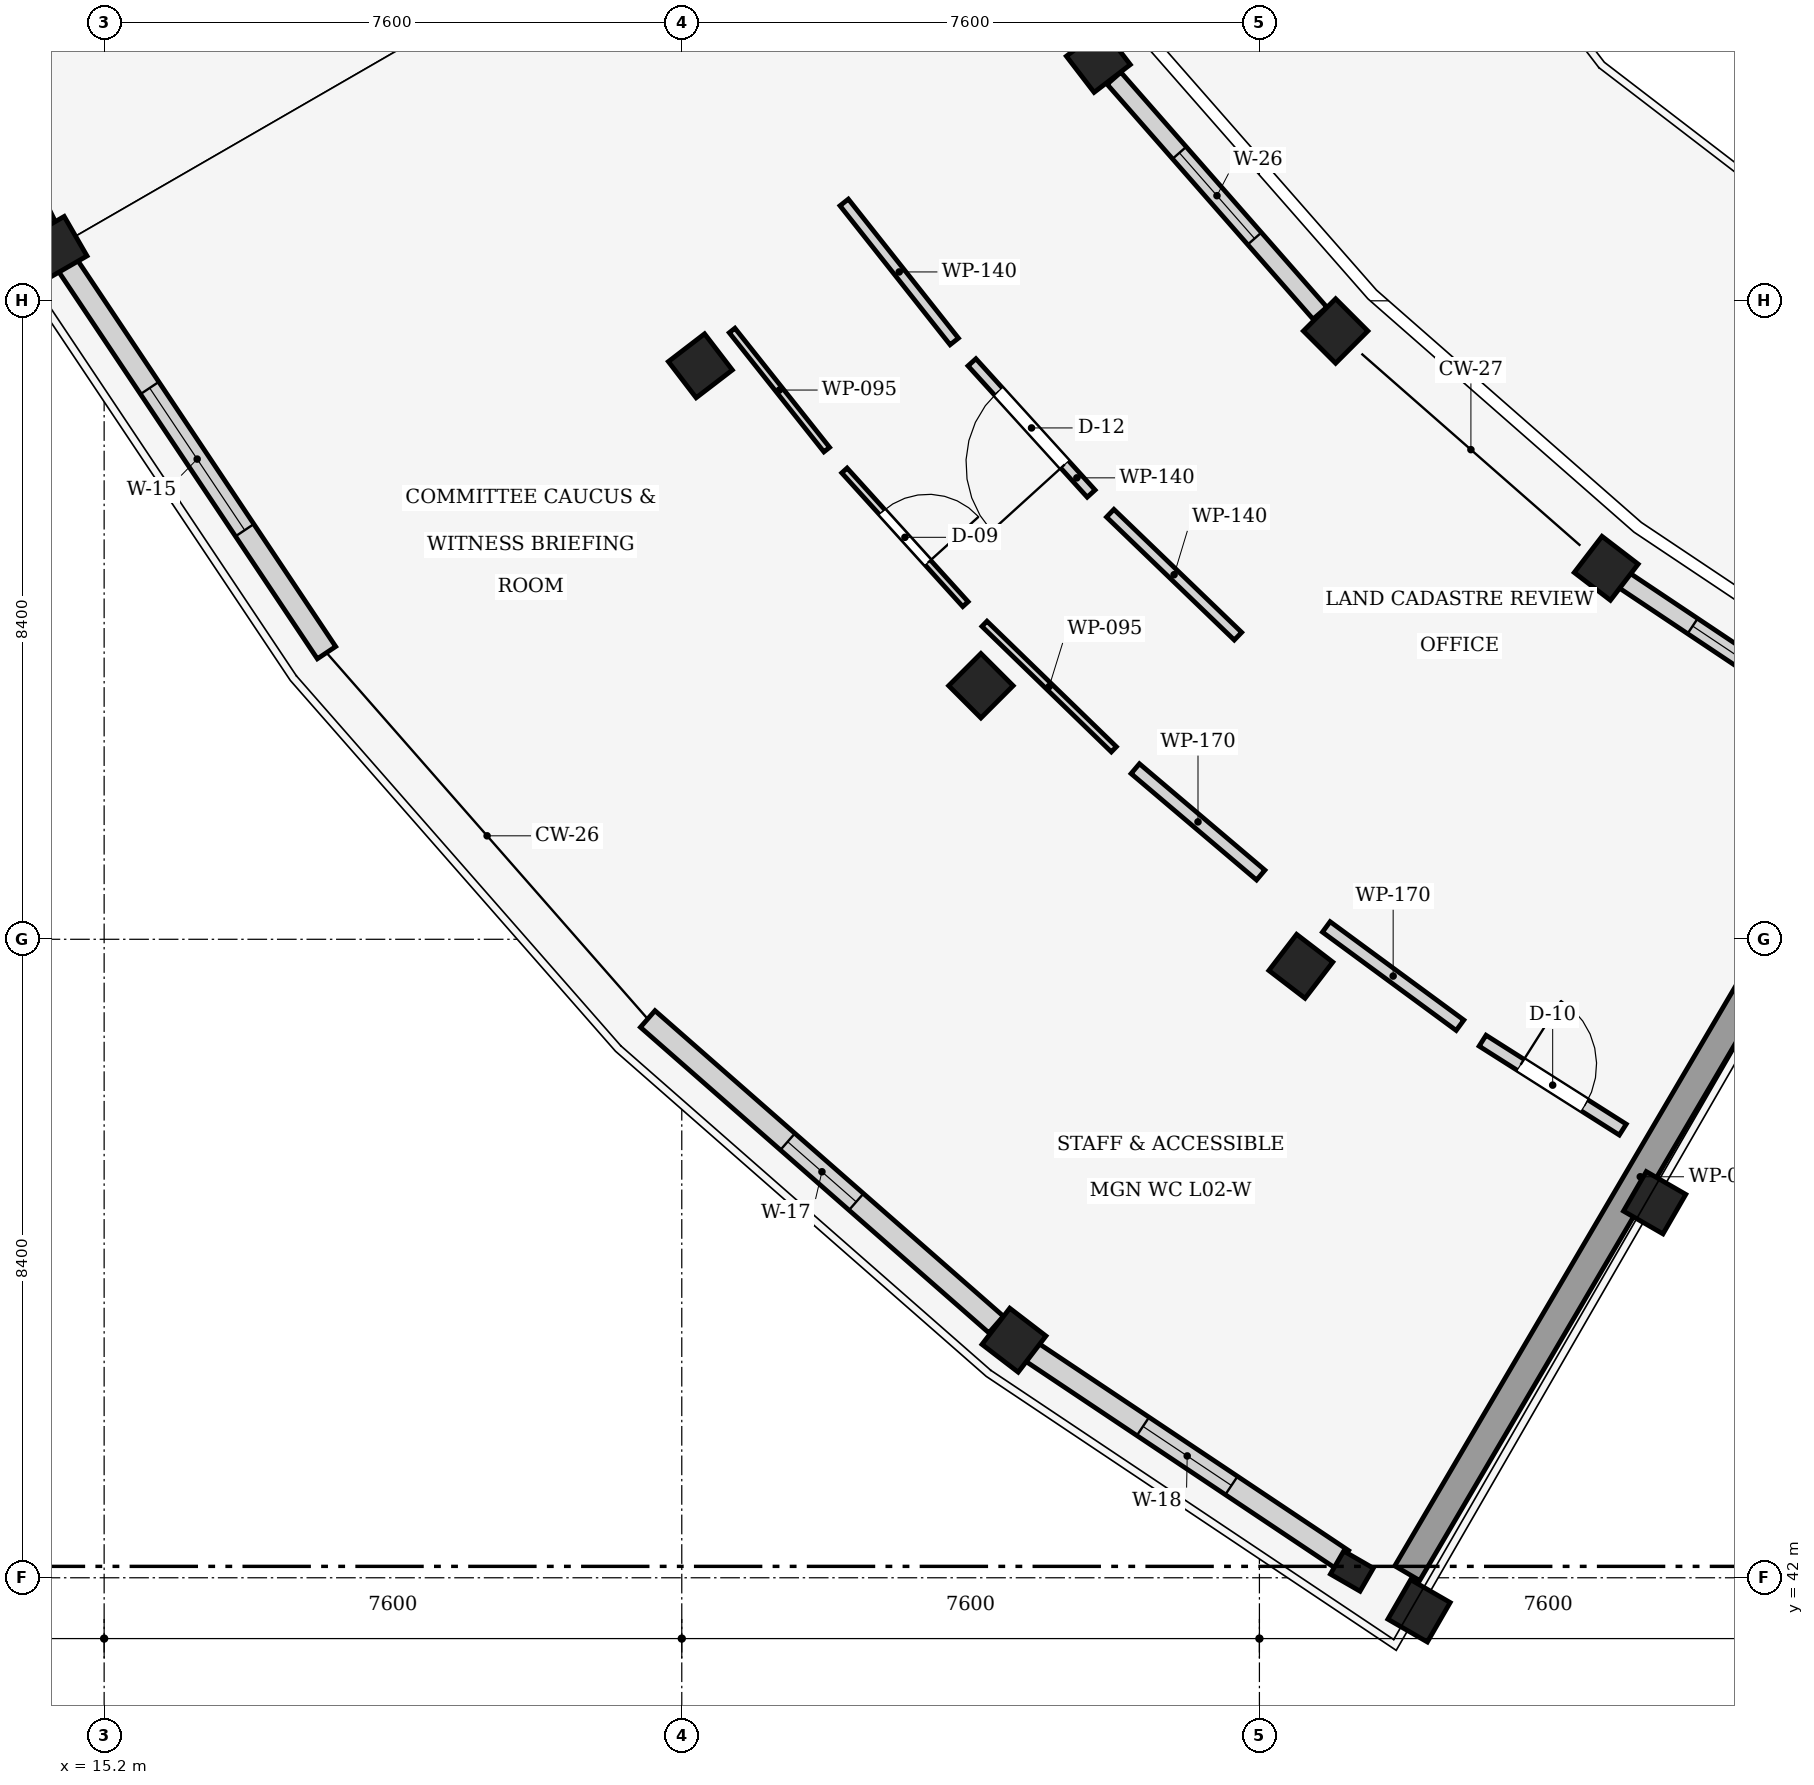
"""IFC4 building model, lengths in metres.
Left out: names, types, materials, properties, quantities, classifications, styles, units other than length and angle.
Written with IfcOpenShell. Run it as: python <this file> out.ifc"""

import sys

from ifc_helpers import new_model, si_unit, direction, frame, frame_2d, origin, origin_2d, place, context, subcontext, project, spatial, rectangle, extrude, element, fill, save


model = new_model("IFC4")
c1 = context("Model", 3, precision=1e-05, world=origin(), true_north=direction((0.0, 1.0)))
c2 = subcontext(c1, "Body", "Model", "MODEL_VIEW")
j1 = project(units=[si_unit("LENGTHUNIT", "METRE"), si_unit("PLANEANGLEUNIT", "RADIAN")], contexts=[c1])
p1 = place(None, origin())
s1 = spatial("IfcSite", under=j1, at=p1, CompositionType="ELEMENT")
p2 = place(p1, origin())
s2 = spatial("IfcBuilding", under=s1, at=p2, CompositionType="ELEMENT")
p3 = place(p2, frame((0.0, 0.0, 9.15)))
s3 = spatial("IfcBuildingStorey", under=s2, at=p3, CompositionType="ELEMENT", Elevation=9.15)
for number, where, z_axis, x_axis in (
    (1, (14.565, 59.5, 0.0), (0.0, 0.0, 1.0), (-0.866, -0.5, 0.0)),
    (2, (28.281, 61.963, 0.0), (0.0, 0.0, 1.0), (-0.793, -0.609, 0.0)),
    (3, (23.044, 57.945, 0.0), (0.0, 0.0, 1.0), (-0.793, -0.609, 0.0)),
    (4, (31.403, 58.403, 0.0), (0.0, 0.0, 1.0), (-0.707, -0.707, 0.0)),
    (5, (26.736, 53.736, 0.0), (0.0, 0.0, 1.0), (-0.707, -0.707, 0.0)),
    (6, (34.963, 55.281, 0.0), (0.0, 0.0, 1.0), (-0.609, -0.793, 0.0)),
    (7, (30.945, 50.044, 0.0), (0.0, 0.0, 1.0), (-0.609, -0.793, 0.0)),
    (8, (27.171, 45.126, 0.0), (0.0, 0.0, 1.0), (-0.609, -0.793, 0.0)),
    (9, (35.6, 46.934, 0.0), (0.0, 0.0, 1.0), (-0.5, -0.866, 0.0)),
    (10, (32.5, 41.565, 0.0), (0.0, 0.0, 1.0), (-0.5, -0.866, 0.0)),
):
    element("IfcColumn", number, at=place(p3, frame(where, z_axis=z_axis, x_axis=x_axis)), inside=s3, PredefinedType="COLUMN", context=c2, shape_type="SweptSolid", body=[
        extrude(rectangle(XDim=0.6, YDim=0.6, at=origin_2d()), origin(), (0.0, 0.0, 1.0), 4.05),
    ])
p4 = place(p3, frame((31.617, 42.087, 0.0), z_axis=(0.0, 0.0, 1.0), x_axis=(-0.5, -0.866025403784, 0.0)))
e11 = element("IfcColumn", 11, at=p4, inside=s3, PredefinedType="PILASTER", context=c2, shape_type="SweptSolid", body=[
    extrude(rectangle(XDim=0.35, YDim=0.45, at=origin_2d()), origin(), (0.0, 0.0, 1.0), 4.05),
])
p5 = place(p3, frame((14.449, 59.735, 0.0), z_axis=(0.0, 0.0, 1.0), x_axis=(-0.442328593944, 0.89685306209, 0.0)))
e12 = element("IfcWall", 12, at=p5, inside=s3, PredefinedType="STANDARD", context=c2, shape_type="SweptSolid", body=[
    extrude(rectangle(XDim=5.885, YDim=0.29, at=frame_2d((2.943, 0.0))), origin(), (0.0, 0.0, 1.0), 3.165),
])
p6 = place(p5, frame((1.943, 0.0, 0.85)))
e13 = element("IfcOpeningElement", 13, at=p6, cuts=e12, PredefinedType="OPENING", context=c2, shape_type="SweptSolid", body=[
    extrude(rectangle(XDim=2.0, YDim=1.5, at=frame_2d((1.0, 0.75))), frame((0.0, 0.155, 0.0), z_axis=(0.0, -1.0, 0.0), x_axis=(1.0, 0.0, 0.0)), (0.0, 0.0, 1.0), 0.31),
])
p7 = place(p3, frame((18.126, 54.171, 0.0), z_axis=(0.0, 0.0, 1.0), x_axis=(-0.555591845488, 0.831455170907, 0.0)))
e14 = element("IfcWall", 14, at=p7, inside=s3, PredefinedType="STANDARD", context=c2, shape_type="SweptSolid", body=[
    extrude(rectangle(XDim=6.127, YDim=0.29, at=frame_2d((3.063, 0.0))), origin(), (0.0, 0.0, 1.0), 3.7),
])
p8 = place(p7, frame((1.938, 0.0, 0.85)))
e15 = element("IfcOpeningElement", 15, at=p8, cuts=e14, PredefinedType="OPENING", context=c2, shape_type="SweptSolid", body=[
    extrude(rectangle(XDim=2.25, YDim=1.5, at=frame_2d((1.125, 0.75))), frame((0.0, 0.155, 0.0), z_axis=(0.0, -1.0, 0.0), x_axis=(1.0, 0.0, 0.0)), (0.0, 0.0, 1.0), 0.31),
])
p9 = place(p3, frame((28.487, 61.728, 0.0), z_axis=(0.0, 0.0, 1.0), x_axis=(0.659315893108, -0.751866047308, 0.0)))
e16 = element("IfcWall", 16, at=p9, inside=s3, PredefinedType="STANDARD", context=c2, shape_type="SweptSolid", body=[
    extrude(rectangle(XDim=4.11, YDim=0.24, at=frame_2d((2.055, 0.0))), origin(), (0.0, 0.0, 1.0), 3.165),
])
p10 = place(p9, frame((1.305, 0.0, 0.85)))
e17 = element("IfcOpeningElement", 17, at=p10, cuts=e16, PredefinedType="OPENING", context=c2, shape_type="SweptSolid", body=[
    extrude(rectangle(XDim=1.5, YDim=1.85, at=frame_2d((0.75, 0.925))), frame((0.0, 0.13, 0.0), z_axis=(0.0, -1.0, 0.0), x_axis=(1.0, 0.0, 0.0)), (0.0, 0.0, 1.0), 0.26),
])
p11 = place(p3, frame((26.936, 45.332, 0.0), z_axis=(0.0, 0.0, 1.0), x_axis=(-0.751841992355, 0.659343323718, 0.0)))
e18 = element("IfcWall", 18, at=p11, inside=s3, PredefinedType="STANDARD", context=c2, shape_type="SweptSolid", body=[
    extrude(rectangle(XDim=6.097, YDim=0.29, at=frame_2d((3.048, 0.0))), origin(), (0.0, 0.0, 1.0), 3.015),
])
p12 = place(p11, frame((2.448, 0.0, 0.85)))
e19 = element("IfcOpeningElement", 19, at=p12, cuts=e18, PredefinedType="OPENING", context=c2, shape_type="SweptSolid", body=[
    extrude(rectangle(XDim=1.2, YDim=1.65, at=frame_2d((0.6, 0.825))), frame((0.0, 0.155, 0.0), z_axis=(0.0, -1.0, 0.0), x_axis=(1.0, 0.0, 0.0)), (0.0, 0.0, 1.0), 0.31),
])
p13 = place(p3, frame((31.494, 42.237, 0.0), z_axis=(0.0, 0.0, 1.0), x_axis=(-0.831469224941, 0.555570812747, 0.0)))
e20 = element("IfcWall", 20, at=p13, inside=s3, PredefinedType="STANDARD", context=c2, shape_type="SweptSolid", body=[
    extrude(rectangle(XDim=4.917, YDim=0.29, at=frame_2d((2.458, 0.0))), origin(), (0.0, 0.0, 1.0), 3.015),
])
p14 = place(p13, frame((1.758, 0.0, 0.85)))
e21 = element("IfcOpeningElement", 21, at=p14, cuts=e20, PredefinedType="OPENING", context=c2, shape_type="SweptSolid", body=[
    extrude(rectangle(XDim=1.4, YDim=1.65, at=frame_2d((0.7, 0.825))), frame((0.0, 0.155, 0.0), z_axis=(0.0, -1.0, 0.0), x_axis=(1.0, 0.0, 0.0)), (0.0, 0.0, 1.0), 0.31),
])
p15 = place(p3, frame((35.198, 55.124, 0.0), z_axis=(0.0, 0.0, 1.0), x_axis=(0.831482404849, -0.555551087144, 0.0)))
e22 = element("IfcWall", 22, at=p15, inside=s3, PredefinedType="STANDARD", context=c2, shape_type="SweptSolid", body=[
    extrude(rectangle(XDim=4.17, YDim=0.24, at=frame_2d((2.085, 0.0))), origin(), (0.0, 0.0, 1.0), 3.015),
])
p16 = place(p15, frame((1.085, 0.0, 0.85)))
e23 = element("IfcOpeningElement", 23, at=p16, cuts=e22, PredefinedType="OPENING", context=c2, shape_type="SweptSolid", body=[
    extrude(rectangle(XDim=2.0, YDim=1.85, at=frame_2d((1.0, 0.925))), frame((0.0, 0.13, 0.0), z_axis=(0.0, -1.0, 0.0), x_axis=(1.0, 0.0, 0.0)), (0.0, 0.0, 1.0), 0.26),
])
p17 = place(p3, frame((38.477, 52.491, 0.0), z_axis=(0.0, 0.0, 1.0), x_axis=(-0.506804958987, -0.862060748177, 0.0)))
e24 = element("IfcWall", 24, at=p17, inside=s3, PredefinedType="SHEAR", context=c2, shape_type="SweptSolid", body=[
    extrude(rectangle(XDim=12.1, YDim=0.38, at=frame_2d((6.05, 0.0))), origin(), (0.0, 0.0, 1.0), 3.75),
])
p18 = place(p3, frame((23.462, 58.41, 0.0), z_axis=(0.0, 0.0, 1.0), x_axis=(0.621895340231, -0.78310036764, 0.0)))
e25 = element("IfcWall", 25, at=p18, inside=s3, PredefinedType="PARTITIONING", context=c2, shape_type="SweptSolid", body=[
    extrude(rectangle(XDim=2.002, YDim=0.095, at=frame_2d((1.001, 0.0))), origin(), (0.0, 0.0, 1.0), 3.015),
])
p19 = place(p3, frame((24.94, 56.568, 0.0), z_axis=(0.0, 0.0, 1.0), x_axis=(0.671247426607, -0.741233358851, 0.0)))
e26 = element("IfcWall", 26, at=p19, inside=s3, PredefinedType="PARTITIONING", context=c2, shape_type="SweptSolid", body=[
    extrude(rectangle(XDim=2.372, YDim=0.095, at=frame_2d((1.186, 0.0))), origin(), (0.0, 0.0, 1.0), 3.7),
])
p20 = place(p19, frame((0.736, 0.0, 0.0)))
e27 = element("IfcOpeningElement", 27, at=p20, cuts=e26, PredefinedType="OPENING", context=c2, shape_type="SweptSolid", body=[
    extrude(rectangle(XDim=0.9, YDim=2.22, at=frame_2d((0.45, 1.11))), frame((0.0, 0.057, 0.0), z_axis=(0.0, -1.0, 0.0), x_axis=(1.0, 0.0, 0.0)), (0.0, 0.0, 1.0), 0.115),
])
p21 = place(p3, frame((26.782, 54.551, 0.0), z_axis=(0.0, 0.0, 1.0), x_axis=(0.717780363552, -0.696269595559, 0.0)))
e28 = element("IfcWall", 28, at=p21, inside=s3, PredefinedType="PARTITIONING", context=c2, shape_type="SweptSolid", body=[
    extrude(rectangle(XDim=2.372, YDim=0.095, at=frame_2d((1.186, 0.0))), origin(), (0.0, 0.0, 1.0), 3.015),
])
p22 = place(p3, frame((31.28, 50.563, 0.0), z_axis=(0.0, 0.0, 1.0), x_axis=(0.805611783676, -0.59244379818, 0.0)))
e29 = element("IfcWall", 29, at=p22, inside=s3, PredefinedType="PARTITIONING", context=c2, shape_type="SweptSolid", body=[
    extrude(rectangle(XDim=2.184, YDim=0.17, at=frame_2d((1.092, 0.0))), origin(), (0.0, 0.0, 1.0), 3.015),
])
p23 = place(p3, frame((33.336, 49.066, 0.0), z_axis=(0.0, 0.0, 1.0), x_axis=(0.844539400536, -0.535493418206, 0.0)))
e30 = element("IfcWall", 30, at=p23, inside=s3, PredefinedType="PARTITIONING", context=c2, shape_type="SweptSolid", body=[
    extrude(rectangle(XDim=2.184, YDim=0.17, at=frame_2d((1.092, 0.0))), origin(), (0.0, 0.0, 1.0), 3.7),
])
p24 = place(p23, frame((0.592, 0.0, 0.0)))
e31 = element("IfcOpeningElement", 31, at=p24, cuts=e30, PredefinedType="OPENING", context=c2, shape_type="SweptSolid", body=[
    extrude(rectangle(XDim=1.0, YDim=2.22, at=frame_2d((0.5, 1.11))), frame((0.0, 0.095, 0.0), z_axis=(0.0, -1.0, 0.0), x_axis=(1.0, 0.0, 0.0)), (0.0, 0.0, 1.0), 0.19),
])
p25 = place(p3, frame((28.767, 52.644, 0.0), z_axis=(0.0, 0.0, 1.0), x_axis=(0.762765431764, -0.646675263255, 0.0)))
e32 = element("IfcWall", 32, at=p25, inside=s3, PredefinedType="PARTITIONING", context=c2, shape_type="SweptSolid", body=[
    extrude(rectangle(XDim=2.164, YDim=0.17, at=frame_2d((1.082, 0.0))), origin(), (0.0, 0.0, 1.0), 3.7),
])
p26 = place(p3, frame((28.186, 56.263, 0.0), z_axis=(0.0, 0.0, 1.0), x_axis=(-0.672224743142, 0.740347144728, 0.0)))
e33 = element("IfcWall", 33, at=p26, inside=s3, PredefinedType="PARTITIONING", context=c2, shape_type="SweptSolid", body=[
    extrude(rectangle(XDim=2.333, YDim=0.14, at=frame_2d((1.167, 0.0))), origin(), (0.0, 0.0, 1.0), 3.7),
])
p27 = place(p26, frame((0.517, 0.0, 0.0)))
e34 = element("IfcOpeningElement", 34, at=p27, cuts=e33, PredefinedType="OPENING", context=c2, shape_type="SweptSolid", body=[
    extrude(rectangle(XDim=1.3, YDim=2.22, at=frame_2d((0.65, 1.11))), frame((0.0, 0.08, 0.0), z_axis=(0.0, -1.0, 0.0), x_axis=(1.0, 0.0, 0.0)), (0.0, 0.0, 1.0), 0.16),
])
p28 = place(p3, frame((26.385, 58.265, 0.0), z_axis=(0.0, 0.0, 1.0), x_axis=(-0.620820865168, 0.783952456066, 0.0)))
e35 = element("IfcWall", 35, at=p28, inside=s3, PredefinedType="PARTITIONING", context=c2, shape_type="SweptSolid", body=[
    extrude(rectangle(XDim=2.333, YDim=0.14, at=frame_2d((1.167, 0.0))), origin(), (0.0, 0.0, 1.0), 3.015),
])
p29 = place(p3, frame((30.118, 54.387, 0.0), z_axis=(0.0, 0.0, 1.0), x_axis=(-0.720477050032, 0.69347878149, 0.0)))
e36 = element("IfcWall", 36, at=p29, inside=s3, PredefinedType="PARTITIONING", context=c2, shape_type="SweptSolid", body=[
    extrude(rectangle(XDim=2.333, YDim=0.14, at=frame_2d((1.167, 0.0))), origin(), (0.0, 0.0, 1.0), 3.015),
])
p30 = place(p8, origin())
e37 = element("IfcWindow", 37, at=p30, inside=s3, PartitioningType="SINGLE_PANEL", PredefinedType="WINDOW", context=c2, shape_type="SweptSolid", body=[
    extrude(rectangle(XDim=2.25, YDim=1.5, at=frame_2d((1.125, 0.75))), frame((0.0, 0.03, 0.0), z_axis=(0.0, -1.0, 0.0), x_axis=(1.0, 0.0, 0.0)), (0.0, 0.0, 1.0), 0.06),
])
fill(e15, e37)
p31 = place(p10, origin())
e38 = element("IfcWindow", 38, at=p31, inside=s3, PartitioningType="SINGLE_PANEL", PredefinedType="WINDOW", context=c2, shape_type="SweptSolid", body=[
    extrude(rectangle(XDim=1.5, YDim=1.85, at=frame_2d((0.75, 0.925))), frame((0.0, 0.03, 0.0), z_axis=(0.0, -1.0, 0.0), x_axis=(1.0, 0.0, 0.0)), (0.0, 0.0, 1.0), 0.06),
])
fill(e17, e38)
p32 = place(p12, origin())
e39 = element("IfcWindow", 39, at=p32, inside=s3, PartitioningType="SINGLE_PANEL", PredefinedType="WINDOW", context=c2, shape_type="SweptSolid", body=[
    extrude(rectangle(XDim=1.2, YDim=1.65, at=frame_2d((0.6, 0.825))), frame((0.0, 0.03, 0.0), z_axis=(0.0, -1.0, 0.0), x_axis=(1.0, 0.0, 0.0)), (0.0, 0.0, 1.0), 0.06),
])
fill(e19, e39)
p33 = place(p14, origin())
e40 = element("IfcWindow", 40, at=p33, inside=s3, PartitioningType="SINGLE_PANEL", PredefinedType="WINDOW", context=c2, shape_type="SweptSolid", body=[
    extrude(rectangle(XDim=1.4, YDim=1.65, at=frame_2d((0.7, 0.825))), frame((0.0, 0.03, 0.0), z_axis=(0.0, -1.0, 0.0), x_axis=(1.0, 0.0, 0.0)), (0.0, 0.0, 1.0), 0.06),
])
fill(e21, e40)
p34 = place(p16, origin())
e41 = element("IfcWindow", 41, at=p34, inside=s3, PartitioningType="SINGLE_PANEL", PredefinedType="WINDOW", context=c2, shape_type="SweptSolid", body=[
    extrude(rectangle(XDim=2.0, YDim=1.85, at=frame_2d((1.0, 0.925))), frame((0.0, 0.03, 0.0), z_axis=(0.0, -1.0, 0.0), x_axis=(1.0, 0.0, 0.0)), (0.0, 0.0, 1.0), 0.06),
])
fill(e23, e41)
p35 = place(p20, origin())
e42 = element("IfcDoor", 42, at=p35, inside=s3, OperationType="SINGLE_SWING_RIGHT", PredefinedType="DOOR", context=c2, shape_type="SweptSolid", body=[
    extrude(rectangle(XDim=0.9, YDim=2.22, at=frame_2d((0.45, 1.11))), frame((0.0, 0.025, 0.0), z_axis=(0.0, -1.0, 0.0), x_axis=(1.0, 0.0, 0.0)), (0.0, 0.0, 1.0), 0.05),
])
fill(e27, e42)
p36 = place(p24, origin())
e43 = element("IfcDoor", 43, at=p36, inside=s3, OperationType="SINGLE_SWING_LEFT", PredefinedType="DOOR", context=c2, shape_type="SweptSolid", body=[
    extrude(rectangle(XDim=1.0, YDim=2.22, at=frame_2d((0.5, 1.11))), frame((0.0, 0.025, 0.0), z_axis=(0.0, -1.0, 0.0), x_axis=(1.0, 0.0, 0.0)), (0.0, 0.0, 1.0), 0.05),
])
fill(e31, e43)
p37 = place(p27, origin())
e44 = element("IfcDoor", 44, at=p37, inside=s3, OperationType="SINGLE_SWING_LEFT", PredefinedType="DOOR", context=c2, shape_type="SweptSolid", body=[
    extrude(rectangle(XDim=1.3, YDim=2.22, at=frame_2d((0.65, 1.11))), frame((0.0, 0.025, 0.0), z_axis=(0.0, -1.0, 0.0), x_axis=(1.0, 0.0, 0.0)), (0.0, 0.0, 1.0), 0.05),
])
fill(e34, e44)
save(model, sys.argv[1])
